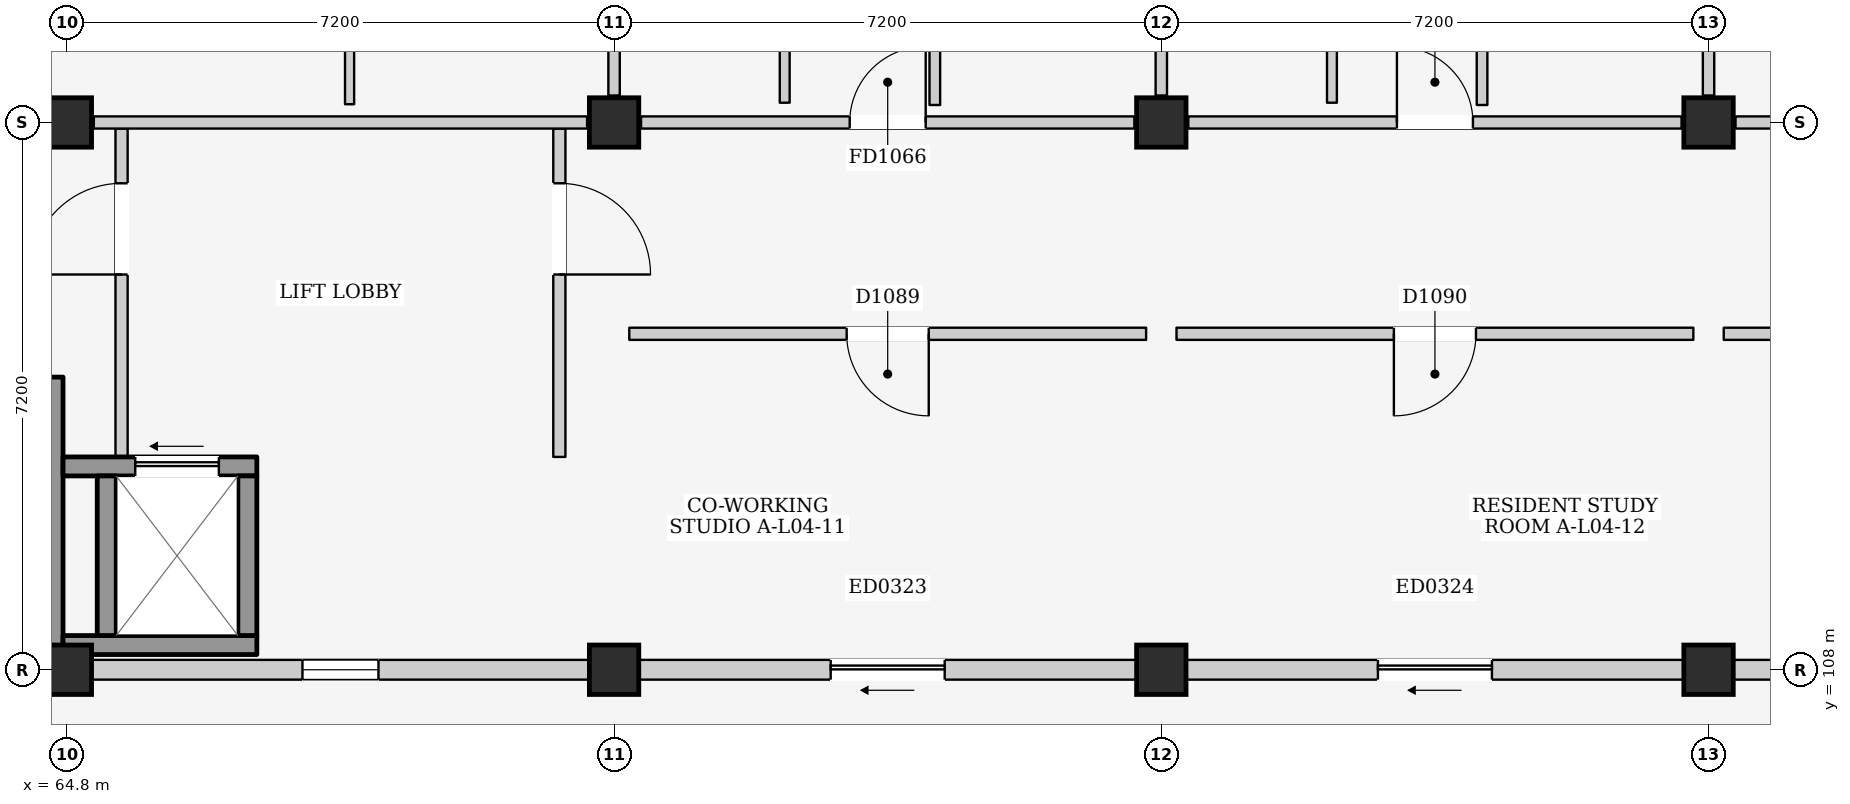
"""IFC4 building model, lengths in metres.
Left out: names, types, materials, properties, quantities, classifications, styles, units other than length and angle.
Written with IfcOpenShell. Run it as: python <this file> out.ifc"""

import sys

from ifc_helpers import new_model, si_unit, direction, frame, frame_2d, origin, origin_2d, place, context, subcontext, project, spatial, rectangle, extrude, element, fill, save


model = new_model("IFC4")
c1 = context("Model", 3, precision=1e-05, world=origin(), true_north=direction((0.0, 1.0)))
c2 = subcontext(c1, "Body", "Model", "MODEL_VIEW")
j1 = project(units=[si_unit("LENGTHUNIT", "METRE"), si_unit("PLANEANGLEUNIT", "RADIAN")], contexts=[c1])
p1 = place(None, origin())
s1 = spatial("IfcSite", under=j1, at=p1, CompositionType="ELEMENT")
p2 = place(p1, origin())
s2 = spatial("IfcBuilding", under=s1, at=p2, CompositionType="ELEMENT")
p3 = place(p2, frame((0.0, 0.0, 15.4)))
s3 = spatial("IfcBuildingStorey", under=s2, at=p3, CompositionType="ELEMENT", Elevation=15.4)
for number, where, z_axis, x_axis in (
    (1, (64.8, 108.0, 0.0), (0.0, 0.0, 1.0), (1.0, 0.0, 0.0)),
    (2, (64.8, 115.2, 0.0), (0.0, 0.0, 1.0), (1.0, 0.0, 0.0)),
    (3, (72.0, 108.0, 0.0), (0.0, 0.0, 1.0), (1.0, 0.0, 0.0)),
    (4, (72.0, 115.2, 0.0), (0.0, 0.0, 1.0), (1.0, 0.0, 0.0)),
    (5, (79.2, 108.0, 0.0), (0.0, 0.0, 1.0), (1.0, 0.0, 0.0)),
    (6, (79.2, 115.2, 0.0), (0.0, 0.0, 1.0), (1.0, 0.0, 0.0)),
    (7, (86.4, 108.0, 0.0), (0.0, 0.0, 1.0), (1.0, 0.0, 0.0)),
    (8, (86.4, 115.2, 0.0), (0.0, 0.0, 1.0), (1.0, 0.0, 0.0)),
):
    element("IfcColumn", number, at=place(p3, frame(where, z_axis=z_axis, x_axis=x_axis)), inside=s3, PredefinedType="COLUMN", context=c2, shape_type="SweptSolid", body=[
        extrude(rectangle(XDim=0.65, YDim=0.65, at=origin_2d()), origin(), (0.0, 0.0, 1.0), 3.2),
    ])
p4 = place(p3, frame((65.125, 108.0, 0.0), z_axis=(0.0, 0.0, 1.0), x_axis=(1.0, 0.0, 0.0)))
e9 = element("IfcWall", 9, at=p4, inside=s3, PredefinedType="ELEMENTEDWALL", context=c2, shape_type="SweptSolid", body=[
    extrude(rectangle(XDim=6.55, YDim=0.26, at=frame_2d((3.275, 0.0))), origin(), (0.0, 0.0, 1.0), 2.285),
])
p5 = place(p4, frame((2.775, 0.0, 1.2)))
e10 = element("IfcOpeningElement", 10, at=p5, cuts=e9, PredefinedType="OPENING", context=c2, shape_type="SweptSolid", body=[
    extrude(rectangle(XDim=1.0, YDim=0.9, at=frame_2d((0.5, 0.45))), frame((0.0, 0.145, 0.0), z_axis=(0.0, -1.0, 0.0), x_axis=(1.0, 0.0, 0.0)), (0.0, 0.0, 1.0), 0.29),
])
p6 = place(p3, frame((72.325, 108.0, 0.0), z_axis=(0.0, 0.0, 1.0), x_axis=(1.0, 0.0, 0.0)))
e11 = element("IfcWall", 11, at=p6, inside=s3, PredefinedType="ELEMENTEDWALL", context=c2, shape_type="SweptSolid", body=[
    extrude(rectangle(XDim=6.55, YDim=0.26, at=frame_2d((3.275, 0.0))), origin(), (0.0, 0.0, 1.0), 2.285),
])
p7 = place(p6, frame((2.525, 0.0, 0.0)))
e12 = element("IfcOpeningElement", 12, at=p7, cuts=e11, PredefinedType="OPENING", context=c2, shape_type="SweptSolid", body=[
    extrude(rectangle(XDim=1.5, YDim=2.12, at=frame_2d((0.75, 1.06))), frame((0.0, 0.145, 0.0), z_axis=(0.0, -1.0, 0.0), x_axis=(1.0, 0.0, 0.0)), (0.0, 0.0, 1.0), 0.29),
])
p8 = place(p3, frame((79.525, 108.0, 0.0), z_axis=(0.0, 0.0, 1.0), x_axis=(1.0, 0.0, 0.0)))
e13 = element("IfcWall", 13, at=p8, inside=s3, PredefinedType="ELEMENTEDWALL", context=c2, shape_type="SweptSolid", body=[
    extrude(rectangle(XDim=6.55, YDim=0.26, at=frame_2d((3.275, 0.0))), origin(), (0.0, 0.0, 1.0), 2.285),
])
p9 = place(p8, frame((2.525, 0.0, 0.0)))
e14 = element("IfcOpeningElement", 14, at=p9, cuts=e13, PredefinedType="OPENING", context=c2, shape_type="SweptSolid", body=[
    extrude(rectangle(XDim=1.5, YDim=2.12, at=frame_2d((0.75, 1.06))), frame((0.0, 0.145, 0.0), z_axis=(0.0, -1.0, 0.0), x_axis=(1.0, 0.0, 0.0)), (0.0, 0.0, 1.0), 0.29),
])
p10 = place(p3, frame((86.725, 108.0, 0.0), z_axis=(0.0, 0.0, 1.0), x_axis=(1.0, 0.0, 0.0)))
e15 = element("IfcWall", 15, at=p10, inside=s3, PredefinedType="ELEMENTEDWALL", context=c2, shape_type="SweptSolid", body=[
    extrude(rectangle(XDim=6.55, YDim=0.26, at=frame_2d((3.275, 0.0))), origin(), (0.0, 0.0, 1.0), 2.285),
])
p11 = place(p10, frame((2.525, 0.0, 0.0)))
e16 = element("IfcOpeningElement", 16, at=p11, cuts=e15, PredefinedType="OPENING", context=c2, shape_type="SweptSolid", body=[
    extrude(rectangle(XDim=1.5, YDim=2.12, at=frame_2d((0.75, 1.06))), frame((0.0, 0.145, 0.0), z_axis=(0.0, -1.0, 0.0), x_axis=(1.0, 0.0, 0.0)), (0.0, 0.0, 1.0), 0.29),
])
p12 = place(p3, frame((64.6, 108.15, 0.0), z_axis=(0.0, 0.0, 1.0), x_axis=(0.0, 1.0, 0.0)))
e17 = element("IfcWall", 17, at=p12, inside=s3, PredefinedType="SHEAR", context=c2, shape_type="SweptSolid", body=[
    extrude(rectangle(XDim=3.7, YDim=0.3, at=frame_2d((1.85, 0.0))), origin(), (0.0, 0.0, 1.0), 2.95),
])
p13 = place(p3, frame((65.52, 110.8, 0.0), z_axis=(0.0, 0.0, 1.0), x_axis=(0.0, 1.0, 0.0)))
e18 = element("IfcWall", 18, at=p13, inside=s3, PredefinedType="PARTITIONING", context=c2, shape_type="SweptSolid", body=[
    extrude(rectangle(XDim=4.32, YDim=0.16, at=frame_2d((2.16, 0.0))), origin(), (0.0, 0.0, 1.0), 2.95),
])
p14 = place(p13, frame((2.4, 0.0, 0.0)))
e19 = element("IfcOpeningElement", 19, at=p14, cuts=e18, PredefinedType="OPENING", context=c2, shape_type="SweptSolid", body=[
    extrude(rectangle(XDim=1.2, YDim=2.2, at=frame_2d((0.6, 1.1))), frame((0.0, 0.095, 0.0), z_axis=(0.0, -1.0, 0.0), x_axis=(1.0, 0.0, 0.0)), (0.0, 0.0, 1.0), 0.19),
])
p15 = place(p3, frame((71.28, 110.8, 0.0), z_axis=(0.0, 0.0, 1.0), x_axis=(0.0, 1.0, 0.0)))
e20 = element("IfcWall", 20, at=p15, inside=s3, PredefinedType="PARTITIONING", context=c2, shape_type="SweptSolid", body=[
    extrude(rectangle(XDim=4.32, YDim=0.16, at=frame_2d((2.16, 0.0))), origin(), (0.0, 0.0, 1.0), 2.95),
])
p16 = place(p15, frame((2.4, 0.0, 0.0)))
e21 = element("IfcOpeningElement", 21, at=p16, cuts=e20, PredefinedType="OPENING", context=c2, shape_type="SweptSolid", body=[
    extrude(rectangle(XDim=1.2, YDim=2.2, at=frame_2d((0.6, 1.1))), frame((0.0, 0.095, 0.0), z_axis=(0.0, -1.0, 0.0), x_axis=(1.0, 0.0, 0.0)), (0.0, 0.0, 1.0), 0.19),
])
p17 = place(p3, frame((64.75, 108.325, 0.0), z_axis=(0.0, 0.0, 1.0), x_axis=(1.0, 0.0, 0.0)))
e22 = element("IfcWall", 22, at=p17, inside=s3, PredefinedType="SHEAR", context=c2, shape_type="SweptSolid", body=[
    extrude(rectangle(XDim=2.55, YDim=0.25, at=frame_2d((1.275, 0.0))), origin(), (0.0, 0.0, 1.0), 2.95),
])
p18 = place(p3, frame((64.75, 110.675, 0.0), z_axis=(0.0, 0.0, 1.0), x_axis=(1.0, 0.0, 0.0)))
e23 = element("IfcWall", 23, at=p18, inside=s3, PredefinedType="SHEAR", context=c2, shape_type="SweptSolid", body=[
    extrude(rectangle(XDim=2.55, YDim=0.25, at=frame_2d((1.275, 0.0))), origin(), (0.0, 0.0, 1.0), 2.95),
])
p19 = place(p18, frame((0.95, 0.0, 0.0)))
e24 = element("IfcOpeningElement", 24, at=p19, cuts=e23, PredefinedType="OPENING", context=c2, shape_type="SweptSolid", body=[
    extrude(rectangle(XDim=1.1, YDim=2.15, at=frame_2d((0.55, 1.075))), frame((0.0, 0.14, 0.0), z_axis=(0.0, -1.0, 0.0), x_axis=(1.0, 0.0, 0.0)), (0.0, 0.0, 1.0), 0.28),
])
for number, where, z_axis, x_axis in (
    (25, (65.325, 108.45, 0.0), (0.0, 0.0, 1.0), (0.0, 1.0, 0.0)),
    (26, (67.175, 108.45, 0.0), (0.0, 0.0, 1.0), (0.0, 1.0, 0.0)),
):
    element("IfcWall", number, at=place(p3, frame(where, z_axis=z_axis, x_axis=x_axis)), inside=s3, PredefinedType="SHEAR", context=c2, shape_type="SweptSolid", body=[
        extrude(rectangle(XDim=2.1, YDim=0.25, at=frame_2d((1.05, 0.0))), origin(), (0.0, 0.0, 1.0), 2.95),
    ])
p20 = place(p3, frame((65.155, 115.2, 0.0), z_axis=(0.0, 0.0, 1.0), x_axis=(1.0, 0.0, 0.0)))
e27 = element("IfcWall", 27, at=p20, inside=s3, PredefinedType="PARTITIONING", context=c2, shape_type="SweptSolid", body=[
    extrude(rectangle(XDim=6.49, YDim=0.16, at=frame_2d((3.245, 0.0))), origin(), (0.0, 0.0, 1.0), 2.285),
])
p21 = place(p3, frame((72.0, 115.555, 0.0), z_axis=(0.0, 0.0, 1.0), x_axis=(0.0, 1.0, 0.0)))
e28 = element("IfcWall", 28, at=p21, inside=s3, PredefinedType="PARTITIONING", context=c2, shape_type="SweptSolid", body=[
    extrude(rectangle(XDim=6.49, YDim=0.15, at=frame_2d((3.245, 0.0))), origin(), (0.0, 0.0, 1.0), 2.385),
])
p22 = place(p3, frame((68.52, 115.44, 0.0), z_axis=(0.0, 0.0, 1.0), x_axis=(0.0, 1.0, 0.0)))
e29 = element("IfcWall", 29, at=p22, inside=s3, PredefinedType="PARTITIONING", context=c2, shape_type="SweptSolid", body=[
    extrude(rectangle(XDim=3.04, YDim=0.12, at=frame_2d((1.52, 0.0))), origin(), (0.0, 0.0, 1.0), 2.95),
])
p23 = place(p22, frame((1.04, 0.0, 0.0)))
e30 = element("IfcOpeningElement", 30, at=p23, cuts=e29, PredefinedType="OPENING", context=c2, shape_type="SweptSolid", body=[
    extrude(rectangle(XDim=0.96, YDim=2.15, at=frame_2d((0.48, 1.075))), frame((0.0, 0.075, 0.0), z_axis=(0.0, -1.0, 0.0), x_axis=(1.0, 0.0, 0.0)), (0.0, 0.0, 1.0), 0.15),
])
p24 = place(p3, frame((72.355, 115.2, 0.0), z_axis=(0.0, 0.0, 1.0), x_axis=(1.0, 0.0, 0.0)))
e31 = element("IfcWall", 31, at=p24, inside=s3, PredefinedType="PARTITIONING", context=c2, shape_type="SweptSolid", body=[
    extrude(rectangle(XDim=6.49, YDim=0.16, at=frame_2d((3.245, 0.0))), origin(), (0.0, 0.0, 1.0), 2.285),
])
p25 = place(p24, frame((2.745, 0.0, 0.0)))
e32 = element("IfcOpeningElement", 32, at=p25, cuts=e31, PredefinedType="OPENING", context=c2, shape_type="SweptSolid", body=[
    extrude(rectangle(XDim=1.0, YDim=2.15, at=frame_2d((0.5, 1.075))), frame((0.0, 0.095, 0.0), z_axis=(0.0, -1.0, 0.0), x_axis=(1.0, 0.0, 0.0)), (0.0, 0.0, 1.0), 0.19),
])
p26 = place(p3, frame((79.2, 115.555, 0.0), z_axis=(0.0, 0.0, 1.0), x_axis=(0.0, 1.0, 0.0)))
e33 = element("IfcWall", 33, at=p26, inside=s3, PredefinedType="PARTITIONING", context=c2, shape_type="SweptSolid", body=[
    extrude(rectangle(XDim=6.49, YDim=0.15, at=frame_2d((3.245, 0.0))), origin(), (0.0, 0.0, 1.0), 2.385),
])
p27 = place(p3, frame((74.245, 115.46, 0.0), z_axis=(0.0, 0.0, 1.0), x_axis=(0.0, 1.0, 0.0)))
e34 = element("IfcWall", 34, at=p27, inside=s3, PredefinedType="PARTITIONING", context=c2, shape_type="SweptSolid", body=[
    extrude(rectangle(XDim=2.13, YDim=0.13, at=frame_2d((1.065, 0.0))), origin(), (0.0, 0.0, 1.0), 2.95),
])
p28 = place(p3, frame((76.22, 115.43, 0.0), z_axis=(0.0, 0.0, 1.0), x_axis=(0.0, 1.0, 0.0)))
e35 = element("IfcWall", 35, at=p28, inside=s3, PredefinedType="PARTITIONING", context=c2, shape_type="SweptSolid", body=[
    extrude(rectangle(XDim=2.15, YDim=0.14, at=frame_2d((1.075, 0.0))), origin(), (0.0, 0.0, 1.0), 2.95),
])
p29 = place(p3, frame((79.555, 115.2, 0.0), z_axis=(0.0, 0.0, 1.0), x_axis=(1.0, 0.0, 0.0)))
e36 = element("IfcWall", 36, at=p29, inside=s3, PredefinedType="PARTITIONING", context=c2, shape_type="SweptSolid", body=[
    extrude(rectangle(XDim=6.49, YDim=0.16, at=frame_2d((3.245, 0.0))), origin(), (0.0, 0.0, 1.0), 2.285),
])
p30 = place(p29, frame((2.745, 0.0, 0.0)))
e37 = element("IfcOpeningElement", 37, at=p30, cuts=e36, PredefinedType="OPENING", context=c2, shape_type="SweptSolid", body=[
    extrude(rectangle(XDim=1.0, YDim=2.15, at=frame_2d((0.5, 1.075))), frame((0.0, 0.095, 0.0), z_axis=(0.0, -1.0, 0.0), x_axis=(1.0, 0.0, 0.0)), (0.0, 0.0, 1.0), 0.19),
])
p31 = place(p3, frame((86.4, 115.555, 0.0), z_axis=(0.0, 0.0, 1.0), x_axis=(0.0, 1.0, 0.0)))
e38 = element("IfcWall", 38, at=p31, inside=s3, PredefinedType="PARTITIONING", context=c2, shape_type="SweptSolid", body=[
    extrude(rectangle(XDim=6.49, YDim=0.15, at=frame_2d((3.245, 0.0))), origin(), (0.0, 0.0, 1.0), 2.385),
])
p32 = place(p3, frame((81.445, 115.46, 0.0), z_axis=(0.0, 0.0, 1.0), x_axis=(0.0, 1.0, 0.0)))
e39 = element("IfcWall", 39, at=p32, inside=s3, PredefinedType="PARTITIONING", context=c2, shape_type="SweptSolid", body=[
    extrude(rectangle(XDim=2.13, YDim=0.13, at=frame_2d((1.065, 0.0))), origin(), (0.0, 0.0, 1.0), 2.95),
])
p33 = place(p3, frame((83.42, 115.43, 0.0), z_axis=(0.0, 0.0, 1.0), x_axis=(0.0, 1.0, 0.0)))
e40 = element("IfcWall", 40, at=p33, inside=s3, PredefinedType="PARTITIONING", context=c2, shape_type="SweptSolid", body=[
    extrude(rectangle(XDim=2.15, YDim=0.14, at=frame_2d((1.075, 0.0))), origin(), (0.0, 0.0, 1.0), 2.95),
])
p34 = place(p3, frame((86.755, 115.2, 0.0), z_axis=(0.0, 0.0, 1.0), x_axis=(1.0, 0.0, 0.0)))
e41 = element("IfcWall", 41, at=p34, inside=s3, PredefinedType="PARTITIONING", context=c2, shape_type="SweptSolid", body=[
    extrude(rectangle(XDim=6.49, YDim=0.16, at=frame_2d((3.245, 0.0))), origin(), (0.0, 0.0, 1.0), 2.285),
])
p35 = place(p34, frame((5.245, 0.0, 0.0)))
e42 = element("IfcOpeningElement", 42, at=p35, cuts=e41, PredefinedType="OPENING", context=c2, shape_type="SweptSolid", body=[
    extrude(rectangle(XDim=1.0, YDim=2.15, at=frame_2d((0.5, 1.075))), frame((0.0, 0.095, 0.0), z_axis=(0.0, -1.0, 0.0), x_axis=(1.0, 0.0, 0.0)), (0.0, 0.0, 1.0), 0.19),
])
p36 = place(p3, frame((72.2, 112.42, 0.0), z_axis=(0.0, 0.0, 1.0), x_axis=(1.0, 0.0, 0.0)))
e43 = element("IfcWall", 43, at=p36, inside=s3, PredefinedType="PARTITIONING", context=c2, shape_type="SweptSolid", body=[
    extrude(rectangle(XDim=6.8, YDim=0.16, at=frame_2d((3.4, 0.0))), origin(), (0.0, 0.0, 1.0), 2.95),
])
p37 = place(p36, frame((2.86, 0.0, 0.0)))
e44 = element("IfcOpeningElement", 44, at=p37, cuts=e43, PredefinedType="OPENING", context=c2, shape_type="SweptSolid", body=[
    extrude(rectangle(XDim=1.08, YDim=2.22, at=frame_2d((0.54, 1.11))), frame((0.0, 0.095, 0.0), z_axis=(0.0, -1.0, 0.0), x_axis=(1.0, 0.0, 0.0)), (0.0, 0.0, 1.0), 0.19),
])
p38 = place(p3, frame((79.4, 112.42, 0.0), z_axis=(0.0, 0.0, 1.0), x_axis=(1.0, 0.0, 0.0)))
e45 = element("IfcWall", 45, at=p38, inside=s3, PredefinedType="PARTITIONING", context=c2, shape_type="SweptSolid", body=[
    extrude(rectangle(XDim=6.8, YDim=0.16, at=frame_2d((3.4, 0.0))), origin(), (0.0, 0.0, 1.0), 2.95),
])
p39 = place(p38, frame((2.86, 0.0, 0.0)))
e46 = element("IfcOpeningElement", 46, at=p39, cuts=e45, PredefinedType="OPENING", context=c2, shape_type="SweptSolid", body=[
    extrude(rectangle(XDim=1.08, YDim=2.22, at=frame_2d((0.54, 1.11))), frame((0.0, 0.095, 0.0), z_axis=(0.0, -1.0, 0.0), x_axis=(1.0, 0.0, 0.0)), (0.0, 0.0, 1.0), 0.19),
])
p40 = place(p3, frame((86.6, 112.42, 0.0), z_axis=(0.0, 0.0, 1.0), x_axis=(1.0, 0.0, 0.0)))
e47 = element("IfcWall", 47, at=p40, inside=s3, PredefinedType="PARTITIONING", context=c2, shape_type="SweptSolid", body=[
    extrude(rectangle(XDim=6.8, YDim=0.16, at=frame_2d((3.4, 0.0))), origin(), (0.0, 0.0, 1.0), 2.95),
])
p41 = place(p40, frame((2.86, 0.0, 0.0)))
e48 = element("IfcOpeningElement", 48, at=p41, cuts=e47, PredefinedType="OPENING", context=c2, shape_type="SweptSolid", body=[
    extrude(rectangle(XDim=1.08, YDim=2.22, at=frame_2d((0.54, 1.11))), frame((0.0, 0.095, 0.0), z_axis=(0.0, -1.0, 0.0), x_axis=(1.0, 0.0, 0.0)), (0.0, 0.0, 1.0), 0.19),
])
p42 = place(p5, origin())
e49 = element("IfcWindow", 49, at=p42, inside=s3, PartitioningType="SINGLE_PANEL", PredefinedType="WINDOW", context=c2, shape_type="SweptSolid", body=[
    extrude(rectangle(XDim=1.0, YDim=0.9, at=frame_2d((0.5, 0.45))), frame((0.0, 0.03, 0.0), z_axis=(0.0, -1.0, 0.0), x_axis=(1.0, 0.0, 0.0)), (0.0, 0.0, 1.0), 0.06),
])
fill(e10, e49)
p43 = place(p7, frame((1.5, 0.0, 0.0), z_axis=(0.0, 0.0, 1.0), x_axis=(-1.0, 0.0, 0.0)))
e50 = element("IfcDoor", 50, at=p43, inside=s3, OperationType="SLIDING_TO_LEFT", PredefinedType="DOOR", context=c2, shape_type="SweptSolid", body=[
    extrude(rectangle(XDim=1.5, YDim=2.12, at=frame_2d((0.75, 1.06))), frame((0.0, 0.025, 0.0), z_axis=(0.0, -1.0, 0.0), x_axis=(1.0, 0.0, 0.0)), (0.0, 0.0, 1.0), 0.05),
])
fill(e12, e50)
p44 = place(p9, frame((1.5, 0.0, 0.0), z_axis=(0.0, 0.0, 1.0), x_axis=(-1.0, 0.0, 0.0)))
e51 = element("IfcDoor", 51, at=p44, inside=s3, OperationType="SLIDING_TO_LEFT", PredefinedType="DOOR", context=c2, shape_type="SweptSolid", body=[
    extrude(rectangle(XDim=1.5, YDim=2.12, at=frame_2d((0.75, 1.06))), frame((0.0, 0.025, 0.0), z_axis=(0.0, -1.0, 0.0), x_axis=(1.0, 0.0, 0.0)), (0.0, 0.0, 1.0), 0.05),
])
fill(e14, e51)
p45 = place(p14, origin())
e52 = element("IfcDoor", 52, at=p45, inside=s3, OperationType="SINGLE_SWING_LEFT", PredefinedType="DOOR", context=c2, shape_type="SweptSolid", body=[
    extrude(rectangle(XDim=1.2, YDim=2.2, at=frame_2d((0.6, 1.1))), frame((0.0, 0.025, 0.0), z_axis=(0.0, -1.0, 0.0), x_axis=(1.0, 0.0, 0.0)), (0.0, 0.0, 1.0), 0.05),
])
fill(e19, e52)
p46 = place(p16, frame((1.2, 0.0, 0.0), z_axis=(0.0, 0.0, 1.0), x_axis=(-1.0, 0.0, 0.0)))
e53 = element("IfcDoor", 53, at=p46, inside=s3, OperationType="SINGLE_SWING_RIGHT", PredefinedType="DOOR", context=c2, shape_type="SweptSolid", body=[
    extrude(rectangle(XDim=1.2, YDim=2.2, at=frame_2d((0.6, 1.1))), frame((0.0, 0.025, 0.0), z_axis=(0.0, -1.0, 0.0), x_axis=(1.0, 0.0, 0.0)), (0.0, 0.0, 1.0), 0.05),
])
fill(e21, e53)
p47 = place(p19, origin())
e54 = element("IfcDoor", 54, at=p47, inside=s3, OperationType="SLIDING_TO_LEFT", PredefinedType="DOOR", context=c2, shape_type="SweptSolid", body=[
    extrude(rectangle(XDim=1.1, YDim=2.15, at=frame_2d((0.55, 1.075))), frame((0.0, 0.025, 0.0), z_axis=(0.0, -1.0, 0.0), x_axis=(1.0, 0.0, 0.0)), (0.0, 0.0, 1.0), 0.05),
])
fill(e24, e54)
p48 = place(p25, origin())
e55 = element("IfcDoor", 55, at=p48, inside=s3, OperationType="SINGLE_SWING_RIGHT", PredefinedType="DOOR", context=c2, shape_type="SweptSolid", body=[
    extrude(rectangle(XDim=1.0, YDim=2.15, at=frame_2d((0.5, 1.075))), frame((0.0, 0.025, 0.0), z_axis=(0.0, -1.0, 0.0), x_axis=(1.0, 0.0, 0.0)), (0.0, 0.0, 1.0), 0.05),
])
fill(e32, e55)
p49 = place(p30, origin())
e56 = element("IfcDoor", 56, at=p49, inside=s3, OperationType="SINGLE_SWING_LEFT", PredefinedType="DOOR", context=c2, shape_type="SweptSolid", body=[
    extrude(rectangle(XDim=1.0, YDim=2.15, at=frame_2d((0.5, 1.075))), frame((0.0, 0.025, 0.0), z_axis=(0.0, -1.0, 0.0), x_axis=(1.0, 0.0, 0.0)), (0.0, 0.0, 1.0), 0.05),
])
fill(e37, e56)
p50 = place(p37, frame((1.08, 0.0, 0.0), z_axis=(0.0, 0.0, 1.0), x_axis=(-1.0, 0.0, 0.0)))
e57 = element("IfcDoor", 57, at=p50, inside=s3, OperationType="SINGLE_SWING_LEFT", PredefinedType="DOOR", context=c2, shape_type="SweptSolid", body=[
    extrude(rectangle(XDim=1.08, YDim=2.22, at=frame_2d((0.54, 1.11))), frame((0.0, 0.025, 0.0), z_axis=(0.0, -1.0, 0.0), x_axis=(1.0, 0.0, 0.0)), (0.0, 0.0, 1.0), 0.05),
])
fill(e44, e57)
p51 = place(p39, frame((1.08, 0.0, 0.0), z_axis=(0.0, 0.0, 1.0), x_axis=(-1.0, 0.0, 0.0)))
e58 = element("IfcDoor", 58, at=p51, inside=s3, OperationType="SINGLE_SWING_RIGHT", PredefinedType="DOOR", context=c2, shape_type="SweptSolid", body=[
    extrude(rectangle(XDim=1.08, YDim=2.22, at=frame_2d((0.54, 1.11))), frame((0.0, 0.025, 0.0), z_axis=(0.0, -1.0, 0.0), x_axis=(1.0, 0.0, 0.0)), (0.0, 0.0, 1.0), 0.05),
])
fill(e46, e58)
save(model, sys.argv[1])
